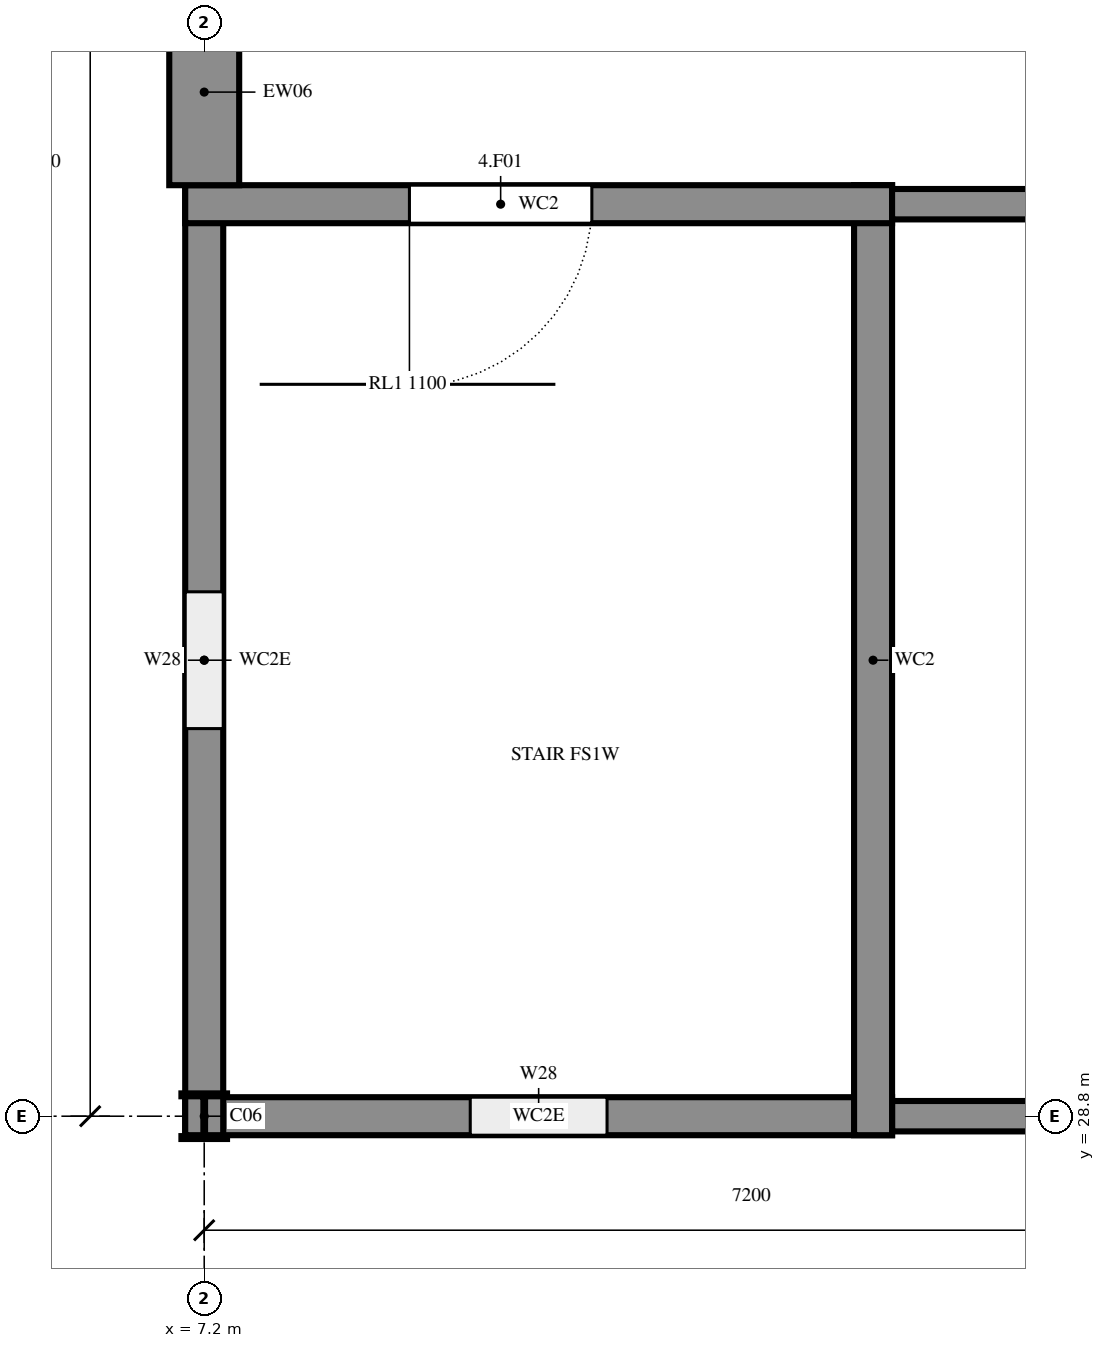
"""IFC4 building model, lengths in metres.
Left out: names, types, materials, properties, quantities, classifications, styles, units other than length and angle.
Written with IfcOpenShell. Run it as: python <this file> out.ifc"""

import sys

from ifc_helpers import new_model, si_unit, direction, frame, frame_2d, origin, origin_2d, place, context, subcontext, project, spatial, rectangle, i_section, extrude, element, fill, save


model = new_model("IFC4")
c1 = context("Model", 3, precision=1e-05, world=origin(), true_north=direction((0.0, 1.0)))
c2 = subcontext(c1, "Body", "Model", "MODEL_VIEW")
j1 = project(units=[si_unit("LENGTHUNIT", "METRE"), si_unit("PLANEANGLEUNIT", "RADIAN")], contexts=[c1])
p1 = place(None, origin())
s1 = spatial("IfcSite", under=j1, at=p1, CompositionType="ELEMENT")
p2 = place(p1, origin())
s2 = spatial("IfcBuilding", under=s1, at=p2, CompositionType="ELEMENT")
p3 = place(p2, frame((0.0, 0.0, 14.4)))
s3 = spatial("IfcBuildingStorey", under=s2, at=p3, CompositionType="ELEMENT", Elevation=14.4)
p4 = place(p3, frame((7.2, 28.8, 0.0), z_axis=(0.0, 0.0, 1.0), x_axis=(1.0, 0.0, 0.0)))
e1 = element("IfcColumn", 1, at=p4, inside=s3, PredefinedType="COLUMN", context=c2, shape_type="SweptSolid", body=[
    extrude(i_section(OverallWidth=0.3, OverallDepth=0.3, WebThickness=0.011, FlangeThickness=0.019, FilletRadius=0.027, at=origin_2d()), origin(), (0.0, 0.0, 1.0), 3.6),
])
p5 = place(p3, frame((7.075, 28.8, 0.0), z_axis=(0.0, 0.0, 1.0), x_axis=(1.0, 0.0, 0.0)))
e2 = element("IfcWall", 2, at=p5, inside=s3, PredefinedType="SHEAR", context=c2, shape_type="SweptSolid", body=[
    extrude(rectangle(XDim=4.65, YDim=0.25, at=frame_2d((2.325, 0.0))), origin(), (0.0, 0.0, 1.0), 3.6),
])
p6 = place(p5, frame((1.875, 0.0, 0.6)))
e3 = element("IfcOpeningElement", 3, at=p6, cuts=e2, PredefinedType="OPENING", context=c2, shape_type="SweptSolid", body=[
    extrude(rectangle(XDim=0.9, YDim=2.1, at=frame_2d((0.45, 1.05))), frame((0.0, 0.135, 0.0), z_axis=(0.0, -1.0, 0.0), x_axis=(1.0, 0.0, 0.0)), (0.0, 0.0, 1.0), 0.27),
])
p7 = place(p3, frame((11.725, 28.8, 0.0), z_axis=(0.0, 0.0, 1.0), x_axis=(1.0, 0.0, 0.0)))
e4 = element("IfcWall", 4, at=p7, inside=s3, PredefinedType="SHEAR", context=c2, shape_type="SweptSolid", body=[
    extrude(rectangle(XDim=2.775, YDim=0.2, at=frame_2d((1.387, 0.0))), origin(), (0.0, 0.0, 1.0), 3.6),
])
p8 = place(p3, frame((11.6, 28.675, 0.0), z_axis=(0.0, 0.0, 1.0), x_axis=(0.0, 1.0, 0.0)))
e5 = element("IfcWall", 5, at=p8, inside=s3, PredefinedType="SHEAR", context=c2, shape_type="SweptSolid", body=[
    extrude(rectangle(XDim=6.25, YDim=0.25, at=frame_2d((3.125, 0.0))), origin(), (0.0, 0.0, 1.0), 3.6),
])
p9 = place(p3, frame((7.2, 34.925, 0.0), z_axis=(0.0, 0.0, 1.0), x_axis=(0.0, -1.0, 0.0)))
e6 = element("IfcWall", 6, at=p9, inside=s3, PredefinedType="SHEAR", context=c2, shape_type="SweptSolid", body=[
    extrude(rectangle(XDim=6.25, YDim=0.25, at=frame_2d((3.125, 0.0))), origin(), (0.0, 0.0, 1.0), 3.6),
])
p10 = place(p9, frame((2.675, 0.0, 0.6)))
e7 = element("IfcOpeningElement", 7, at=p10, cuts=e6, PredefinedType="OPENING", context=c2, shape_type="SweptSolid", body=[
    extrude(rectangle(XDim=0.9, YDim=2.1, at=frame_2d((0.45, 1.05))), frame((0.0, 0.135, 0.0), z_axis=(0.0, -1.0, 0.0), x_axis=(1.0, 0.0, 0.0)), (0.0, 0.0, 1.0), 0.27),
])
p11 = place(p3, frame((11.725, 34.8, 0.0), z_axis=(0.0, 0.0, 1.0), x_axis=(-1.0, 0.0, 0.0)))
e8 = element("IfcWall", 8, at=p11, inside=s3, PredefinedType="SHEAR", context=c2, shape_type="SweptSolid", body=[
    extrude(rectangle(XDim=4.65, YDim=0.25, at=frame_2d((2.325, 0.0))), origin(), (0.0, 0.0, 1.0), 3.6),
])
p12 = place(p11, frame((1.975, 0.0, 0.0)))
e9 = element("IfcOpeningElement", 9, at=p12, cuts=e8, PredefinedType="OPENING", context=c2, shape_type="SweptSolid", body=[
    extrude(rectangle(XDim=1.2, YDim=2.4, at=frame_2d((0.6, 1.2))), frame((0.0, 0.135, 0.0), z_axis=(0.0, -1.0, 0.0), x_axis=(1.0, 0.0, 0.0)), (0.0, 0.0, 1.0), 0.27),
])
p13 = place(p3, frame((14.5, 34.8, 0.0), z_axis=(0.0, 0.0, 1.0), x_axis=(-1.0, 0.0, 0.0)))
e10 = element("IfcWall", 10, at=p13, inside=s3, PredefinedType="SHEAR", context=c2, shape_type="SweptSolid", body=[
    extrude(rectangle(XDim=2.775, YDim=0.2, at=frame_2d((1.387, 0.0))), origin(), (0.0, 0.0, 1.0), 3.6),
])
p14 = place(p13, frame((0.95, 0.0, 0.0)))
e11 = element("IfcOpeningElement", 11, at=p14, cuts=e10, PredefinedType="OPENING", context=c2, shape_type="SweptSolid", body=[
    extrude(rectangle(XDim=0.85, YDim=2.1, at=frame_2d((0.425, 1.05))), frame((0.0, 0.11, 0.0), z_axis=(0.0, -1.0, 0.0), x_axis=(1.0, 0.0, 0.0)), (0.0, 0.0, 1.0), 0.22),
])
p15 = place(p3, frame((7.2, 36.15, 0.0), z_axis=(0.0, 0.0, 1.0), x_axis=(0.0, -1.0, 0.0)))
e12 = element("IfcWall", 12, at=p15, inside=s3, PredefinedType="SOLIDWALL", context=c2, shape_type="SweptSolid", body=[
    extrude(rectangle(XDim=1.225, YDim=0.46, at=frame_2d((0.612, 0.0))), origin(), (0.0, 0.0, 1.0), 3.22),
])
p16 = place(p6, origin())
e13 = element("IfcWindow", 13, at=p16, inside=s3, PartitioningType="SINGLE_PANEL", PredefinedType="WINDOW", context=c2, shape_type="SweptSolid", body=[
    extrude(rectangle(XDim=0.9, YDim=2.1, at=frame_2d((0.45, 1.05))), frame((0.0, 0.03, 0.0), z_axis=(0.0, -1.0, 0.0), x_axis=(1.0, 0.0, 0.0)), (0.0, 0.0, 1.0), 0.06),
])
fill(e3, e13)
p17 = place(p10, origin())
e14 = element("IfcWindow", 14, at=p17, inside=s3, PartitioningType="SINGLE_PANEL", PredefinedType="WINDOW", context=c2, shape_type="SweptSolid", body=[
    extrude(rectangle(XDim=0.9, YDim=2.1, at=frame_2d((0.45, 1.05))), frame((0.0, 0.03, 0.0), z_axis=(0.0, -1.0, 0.0), x_axis=(1.0, 0.0, 0.0)), (0.0, 0.0, 1.0), 0.06),
])
fill(e7, e14)
p18 = place(p12, origin())
e15 = element("IfcDoor", 15, at=p18, inside=s3, OperationType="SINGLE_SWING_LEFT", PredefinedType="DOOR", context=c2, shape_type="SweptSolid", body=[
    extrude(rectangle(XDim=1.2, YDim=2.4, at=frame_2d((0.6, 1.2))), frame((0.0, 0.025, 0.0), z_axis=(0.0, -1.0, 0.0), x_axis=(1.0, 0.0, 0.0)), (0.0, 0.0, 1.0), 0.05),
])
fill(e9, e15)
save(model, sys.argv[1])
